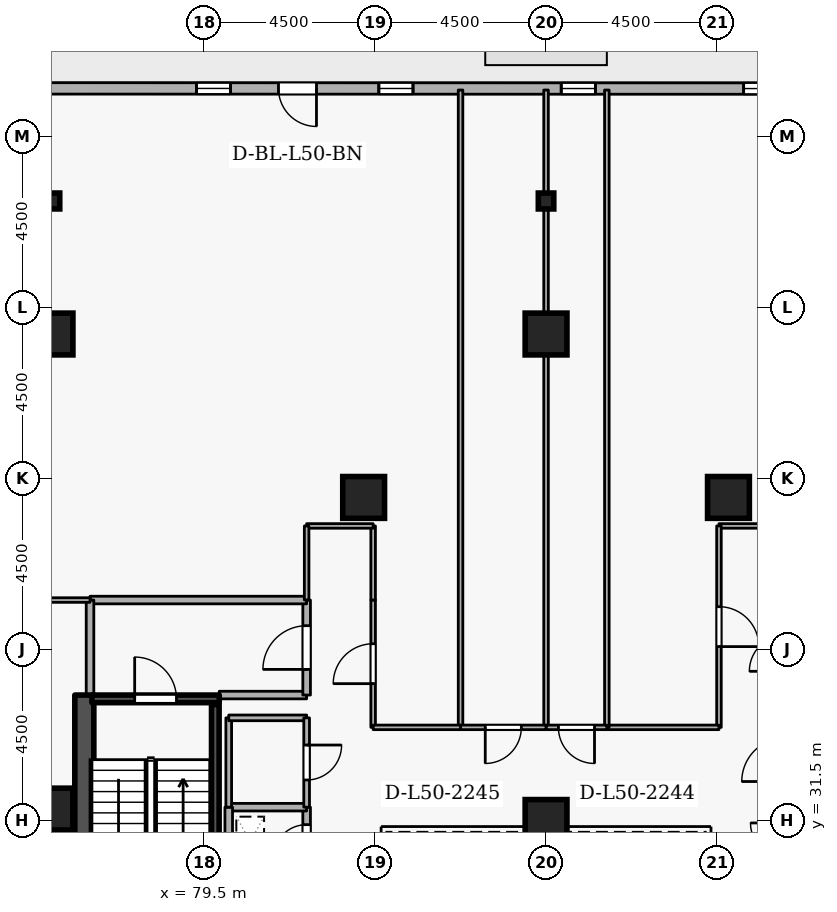
"""IFC4 building model, lengths in metres.
Left out: names, types, materials, properties, quantities, classifications, styles, units other than length and angle.
Written with IfcOpenShell. Run it as: python <this file> out.ifc"""

import sys

from ifc_helpers import new_model, si_unit, direction, frame, frame_2d, origin, origin_2d, place, context, subcontext, project, spatial, rectangle, i_section, extrude, element, fill, save


model = new_model("IFC4")
c1 = context("Model", 3, precision=1e-05, world=origin(), true_north=direction((0.0, 1.0)))
c2 = subcontext(c1, "Body", "Model", "MODEL_VIEW")
j1 = project(units=[si_unit("LENGTHUNIT", "METRE"), si_unit("PLANEANGLEUNIT", "RADIAN")], contexts=[c1])
p1 = place(None, origin())
s1 = spatial("IfcSite", under=j1, at=p1, CompositionType="ELEMENT")
p2 = place(p1, origin())
s2 = spatial("IfcBuilding", under=s1, at=p2, CompositionType="ELEMENT")
p3 = place(p2, frame((0.0, 0.0, 189.3)))
s3 = spatial("IfcBuildingStorey", under=s2, at=p3, CompositionType="ELEMENT", Elevation=189.3)
p4 = place(p3, frame((76.35, 19.2, 0.0), z_axis=(0.0, 0.0, 1.0), x_axis=(0.0, 1.0, 0.0)))
e1 = element("IfcWall", 1, at=p4, inside=s3, PredefinedType="SHEAR", context=c2, shape_type="SweptSolid", body=[
    extrude(rectangle(XDim=15.6, YDim=0.5, at=frame_2d((7.8, 0.0))), origin(), (0.0, 0.0, 1.0), 3.6),
])
for number, where, z_axis, x_axis in (
    (2, (88.5, 44.3, 0.0), (0.0, 0.0, 1.0), (1.0, 0.0, 0.0)),
    (3, (75.5, 44.3, 0.0), (0.0, 0.0, 1.0), (1.0, 0.0, 0.0)),
    (4, (93.3, 40.0, 0.0), (0.0, 0.0, 1.0), (1.0, 0.0, 0.0)),
    (5, (83.7, 40.0, 0.0), (0.0, 0.0, 1.0), (1.0, 0.0, 0.0)),
    (6, (75.5, 31.8, 0.0), (0.0, 0.0, 1.0), (1.0, 0.0, 0.0)),
    (7, (88.5, 31.5, 0.0), (0.0, 0.0, 1.0), (1.0, 0.0, 0.0)),
):
    element("IfcColumn", number, at=place(p3, frame(where, z_axis=z_axis, x_axis=x_axis)), inside=s3, PredefinedType="COLUMN", context=c2, shape_type="SweptSolid", body=[
        extrude(rectangle(XDim=1.1, YDim=1.1, at=origin_2d()), origin(), (0.0, 0.0, 1.0), 3.6),
    ])
for number, where, z_axis, x_axis in (
    (8, (88.5, 47.8, 0.0), (0.0, 0.0, 1.0), (1.0, 0.0, 0.0)),
    (9, (75.5, 47.8, 0.0), (0.0, 0.0, 1.0), (1.0, 0.0, 0.0)),
):
    element("IfcColumn", number, at=place(p3, frame(where, z_axis=z_axis, x_axis=x_axis)), inside=s3, PredefinedType="COLUMN", context=c2, shape_type="SweptSolid", body=[
        extrude(i_section(OverallWidth=0.407, OverallDepth=0.419, WebThickness=0.031, FlangeThickness=0.049, FilletRadius=0.015, at=origin_2d()), origin(), (0.0, 0.0, 1.0), 3.6),
    ])
p5 = place(p3, frame((101.199, 50.756, 0.0), z_axis=(0.0, 0.0, 1.0), x_axis=(-0.999999969988, 0.000244999128, 0.0)))
e10 = element("IfcWall", 10, at=p5, inside=s3, PredefinedType="STANDARD", context=c2, shape_type="SweptSolid", body=[
    extrude(rectangle(XDim=33.881, YDim=0.3, at=frame_2d((16.94, 0.0))), origin(), (0.0, 0.0, 1.0), 2.7),
])
p6 = place(p5, frame((18.74, 0.0, 0.0)))
e11 = element("IfcOpeningElement", 11, at=p6, cuts=e10, PredefinedType="OPENING", context=c2, shape_type="SweptSolid", body=[
    extrude(rectangle(XDim=1.0, YDim=2.08, at=frame_2d((0.5, 1.04))), frame((0.0, 0.16, 0.0), z_axis=(0.0, -1.0, 0.0), x_axis=(1.0, 0.0, 0.0)), (0.0, 0.0, 1.0), 0.32),
])
p7 = place(p5, frame((1.8, 0.0, 0.72)))
e12 = element("IfcOpeningElement", 12, at=p7, cuts=e10, PredefinedType="OPENING", context=c2, shape_type="SweptSolid", body=[
    extrude(rectangle(XDim=0.9, YDim=1.75, at=frame_2d((0.45, 0.875))), frame((0.0, 0.16, 0.0), z_axis=(0.0, -1.0, 0.0), x_axis=(1.0, 0.0, 0.0)), (0.0, 0.0, 1.0), 0.32),
])
p8 = place(p5, frame((6.6, 0.0, 0.72)))
e13 = element("IfcOpeningElement", 13, at=p8, cuts=e10, PredefinedType="OPENING", context=c2, shape_type="SweptSolid", body=[
    extrude(rectangle(XDim=0.9, YDim=1.75, at=frame_2d((0.45, 0.875))), frame((0.0, 0.16, 0.0), z_axis=(0.0, -1.0, 0.0), x_axis=(1.0, 0.0, 0.0)), (0.0, 0.0, 1.0), 0.32),
])
p9 = place(p5, frame((11.4, 0.0, 0.72)))
e14 = element("IfcOpeningElement", 14, at=p9, cuts=e10, PredefinedType="OPENING", context=c2, shape_type="SweptSolid", body=[
    extrude(rectangle(XDim=0.9, YDim=1.75, at=frame_2d((0.45, 0.875))), frame((0.0, 0.16, 0.0), z_axis=(0.0, -1.0, 0.0), x_axis=(1.0, 0.0, 0.0)), (0.0, 0.0, 1.0), 0.32),
])
p10 = place(p5, frame((16.2, 0.0, 0.72)))
e15 = element("IfcOpeningElement", 15, at=p10, cuts=e10, PredefinedType="OPENING", context=c2, shape_type="SweptSolid", body=[
    extrude(rectangle(XDim=0.9, YDim=1.75, at=frame_2d((0.45, 0.875))), frame((0.0, 0.16, 0.0), z_axis=(0.0, -1.0, 0.0), x_axis=(1.0, 0.0, 0.0)), (0.0, 0.0, 1.0), 0.32),
])
p11 = place(p5, frame((21.0, 0.0, 0.72)))
e16 = element("IfcOpeningElement", 16, at=p11, cuts=e10, PredefinedType="OPENING", context=c2, shape_type="SweptSolid", body=[
    extrude(rectangle(XDim=0.9, YDim=1.75, at=frame_2d((0.45, 0.875))), frame((0.0, 0.16, 0.0), z_axis=(0.0, -1.0, 0.0), x_axis=(1.0, 0.0, 0.0)), (0.0, 0.0, 1.0), 0.32),
])
p12 = place(p5, frame((25.8, 0.0, 0.72)))
e17 = element("IfcOpeningElement", 17, at=p12, cuts=e10, PredefinedType="OPENING", context=c2, shape_type="SweptSolid", body=[
    extrude(rectangle(XDim=0.9, YDim=1.75, at=frame_2d((0.45, 0.875))), frame((0.0, 0.16, 0.0), z_axis=(0.0, -1.0, 0.0), x_axis=(1.0, 0.0, 0.0)), (0.0, 0.0, 1.0), 0.32),
])
p13 = place(p5, frame((30.6, 0.0, 0.72)))
e18 = element("IfcOpeningElement", 18, at=p13, cuts=e10, PredefinedType="OPENING", context=c2, shape_type="SweptSolid", body=[
    extrude(rectangle(XDim=0.9, YDim=1.75, at=frame_2d((0.45, 0.875))), frame((0.0, 0.16, 0.0), z_axis=(0.0, -1.0, 0.0), x_axis=(1.0, 0.0, 0.0)), (0.0, 0.0, 1.0), 0.32),
])
p14 = place(p3, frame((76.55, 34.7, 0.0), z_axis=(0.0, 0.0, 1.0), x_axis=(1.0, 0.0, 0.0)))
e19 = element("IfcWall", 19, at=p14, inside=s3, PredefinedType="SHEAR", context=c2, shape_type="SweptSolid", body=[
    extrude(rectangle(XDim=3.35, YDim=0.2, at=frame_2d((1.675, 0.0))), origin(), (0.0, 0.0, 1.0), 3.6),
])
p15 = place(p14, frame((1.125, 0.0, 0.0)))
e20 = element("IfcOpeningElement", 20, at=p15, cuts=e19, PredefinedType="OPENING", context=c2, shape_type="SweptSolid", body=[
    extrude(rectangle(XDim=1.1, YDim=2.1, at=frame_2d((0.55, 1.05))), frame((0.0, 0.11, 0.0), z_axis=(0.0, -1.0, 0.0), x_axis=(1.0, 0.0, 0.0)), (0.0, 0.0, 1.0), 0.22),
])
p16 = place(p3, frame((79.797, 27.45, 0.0), z_axis=(0.0, 0.0, 1.0), x_axis=(0.0, 1.0, 0.0)))
e21 = element("IfcWall", 21, at=p16, inside=s3, PredefinedType="SHEAR", context=c2, shape_type="SweptSolid", body=[
    extrude(rectangle(XDim=7.1, YDim=0.2, at=frame_2d((3.55, 0.0))), origin(), (0.0, 0.0, 1.0), 3.6),
])
p17 = place(p3, frame((79.9, 34.8, 0.0), z_axis=(0.0, 0.0, 1.0), x_axis=(1.0, 0.0, 0.0)))
e22 = element("IfcWall", 22, at=p17, inside=s3, PredefinedType="STANDARD", context=c2, shape_type="SweptSolid", body=[
    extrude(rectangle(XDim=2.3, YDim=0.2, at=frame_2d((1.15, 0.0))), origin(), (0.0, 0.0, 1.0), 2.545),
])
p18 = place(p3, frame((82.2, 34.8, 0.0), z_axis=(0.0, 0.0, 1.0), x_axis=(0.0, 1.0, 0.0)))
e23 = element("IfcWall", 23, at=p18, inside=s3, PredefinedType="STANDARD", context=c2, shape_type="SweptSolid", body=[
    extrude(rectangle(XDim=2.5, YDim=0.2, at=frame_2d((1.25, 0.0))), origin(), (0.0, 0.0, 1.0), 3.34),
])
p19 = place(p18, frame((0.675, 0.0, 0.0)))
e24 = element("IfcOpeningElement", 24, at=p19, cuts=e23, PredefinedType="OPENING", context=c2, shape_type="SweptSolid", body=[
    extrude(rectangle(XDim=1.15, YDim=2.1, at=frame_2d((0.575, 1.05))), frame((0.0, 0.11, 0.0), z_axis=(0.0, -1.0, 0.0), x_axis=(1.0, 0.0, 0.0)), (0.0, 0.0, 1.0), 0.22),
])
p20 = place(p3, frame((82.2, 37.3, 0.0), z_axis=(0.0, 0.0, 1.0), x_axis=(-1.0, 0.0, 0.0)))
e25 = element("IfcWall", 25, at=p20, inside=s3, PredefinedType="STANDARD", context=c2, shape_type="SweptSolid", body=[
    extrude(rectangle(XDim=5.7, YDim=0.2, at=frame_2d((2.85, 0.0))), origin(), (0.0, 0.0, 1.0), 3.34),
])
p21 = place(p3, frame((76.5, 37.3, 0.0), z_axis=(0.0, 0.0, 1.0), x_axis=(0.0, -1.0, 0.0)))
e26 = element("IfcWall", 26, at=p21, inside=s3, PredefinedType="STANDARD", context=c2, shape_type="SweptSolid", body=[
    extrude(rectangle(XDim=2.5, YDim=0.2, at=frame_2d((1.25, 0.0))), origin(), (0.0, 0.0, 1.0), 3.34),
])
p22 = place(p3, frame((82.2, 30.05, 0.0), z_axis=(0.0, 0.0, 1.0), x_axis=(0.0, 1.0, 0.0)))
e27 = element("IfcWall", 27, at=p22, inside=s3, PredefinedType="STANDARD", context=c2, shape_type="SweptSolid", body=[
    extrude(rectangle(XDim=1.8, YDim=0.2, at=frame_2d((0.9, 0.0))), origin(), (0.0, 0.0, 1.0), 3.34),
])
p23 = place(p22, frame((0.46, 0.0, 0.0)))
e28 = element("IfcOpeningElement", 28, at=p23, cuts=e27, PredefinedType="OPENING", context=c2, shape_type="SweptSolid", body=[
    extrude(rectangle(XDim=0.88, YDim=2.04, at=frame_2d((0.44, 1.02))), frame((0.0, 0.11, 0.0), z_axis=(0.0, -1.0, 0.0), x_axis=(1.0, 0.0, 0.0)), (0.0, 0.0, 1.0), 0.22),
])
p24 = place(p3, frame((82.2, 31.85, 0.0), z_axis=(0.0, 0.0, 1.0), x_axis=(-1.0, 0.0, 0.0)))
e29 = element("IfcWall", 29, at=p24, inside=s3, PredefinedType="STANDARD", context=c2, shape_type="SweptSolid", body=[
    extrude(rectangle(XDim=2.05, YDim=0.2, at=frame_2d((1.025, 0.0))), origin(), (0.0, 0.0, 1.0), 3.34),
])
p25 = place(p3, frame((80.15, 31.85, 0.0), z_axis=(0.0, 0.0, 1.0), x_axis=(0.0, -1.0, 0.0)))
e30 = element("IfcWall", 30, at=p25, inside=s3, PredefinedType="STANDARD", context=c2, shape_type="SweptSolid", body=[
    extrude(rectangle(XDim=1.8, YDim=0.2, at=frame_2d((0.9, 0.0))), origin(), (0.0, 0.0, 1.0), 3.34),
])
p26 = place(p3, frame((80.15, 31.85, 0.0), z_axis=(0.0, 0.0, 1.0), x_axis=(0.0, 1.0, 0.0)))
e31 = element("IfcWall", 31, at=p26, inside=s3, PredefinedType="PARTITIONING", context=c2, shape_type="SweptSolid", body=[
    extrude(rectangle(XDim=2.35, YDim=0.15, at=frame_2d((1.175, 0.0))), origin(), (0.0, 0.0, 1.0), 3.34),
])
p27 = place(p3, frame((80.15, 34.2, 0.0), z_axis=(0.0, 0.0, 1.0), x_axis=(1.0, 0.0, 0.0)))
e32 = element("IfcWall", 32, at=p27, inside=s3, PredefinedType="PARTITIONING", context=c2, shape_type="SweptSolid", body=[
    extrude(rectangle(XDim=2.05, YDim=0.15, at=frame_2d((1.025, 0.0))), origin(), (0.0, 0.0, 1.0), 2.545),
])
p28 = place(p3, frame((82.2, 34.2, 0.0), z_axis=(0.0, 0.0, 1.0), x_axis=(0.0, -1.0, 0.0)))
e33 = element("IfcWall", 33, at=p28, inside=s3, PredefinedType="PARTITIONING", context=c2, shape_type="SweptSolid", body=[
    extrude(rectangle(XDim=2.35, YDim=0.15, at=frame_2d((1.175, 0.0))), origin(), (0.0, 0.0, 1.0), 3.34),
])
p29 = place(p28, frame((0.715, 0.0, 0.0)))
e34 = element("IfcOpeningElement", 34, at=p29, cuts=e33, PredefinedType="OPENING", context=c2, shape_type="SweptSolid", body=[
    extrude(rectangle(XDim=0.92, YDim=2.08, at=frame_2d((0.46, 1.04))), frame((0.0, 0.085, 0.0), z_axis=(0.0, -1.0, 0.0), x_axis=(1.0, 0.0, 0.0)), (0.0, 0.0, 1.0), 0.17),
])
p30 = place(p3, frame((94.8, 39.25, 0.0), z_axis=(0.0, 0.0, 1.0), x_axis=(-1.0, 0.0, 0.0)))
e35 = element("IfcWall", 35, at=p30, inside=s3, PredefinedType="PARTITIONING", context=c2, shape_type="SweptSolid", body=[
    extrude(rectangle(XDim=1.75, YDim=0.12, at=frame_2d((0.875, 0.0))), origin(), (0.0, 0.0, 1.0), 3.34),
])
p31 = place(p3, frame((93.05, 39.25, 0.0), z_axis=(0.0, 0.0, 1.0), x_axis=(0.0, -1.0, 0.0)))
e36 = element("IfcWall", 36, at=p31, inside=s3, PredefinedType="PARTITIONING", context=c2, shape_type="SweptSolid", body=[
    extrude(rectangle(XDim=5.3, YDim=0.12, at=frame_2d((2.65, 0.0))), origin(), (0.0, 0.0, 1.0), 3.34),
])
p32 = place(p31, frame((2.125, 0.0, 0.0)))
e37 = element("IfcOpeningElement", 37, at=p32, cuts=e36, PredefinedType="OPENING", context=c2, shape_type="SweptSolid", body=[
    extrude(rectangle(XDim=1.05, YDim=2.1, at=frame_2d((0.525, 1.05))), frame((0.0, 0.07, 0.0), z_axis=(0.0, -1.0, 0.0), x_axis=(1.0, 0.0, 0.0)), (0.0, 0.0, 1.0), 0.14),
])
p33 = place(p3, frame((93.05, 33.95, 0.0), z_axis=(0.0, 0.0, 1.0), x_axis=(-1.0, 0.0, 0.0)))
e38 = element("IfcWall", 38, at=p33, inside=s3, PredefinedType="PARTITIONING", context=c2, shape_type="SweptSolid", body=[
    extrude(rectangle(XDim=2.95, YDim=0.12, at=frame_2d((1.475, 0.0))), origin(), (0.0, 0.0, 1.0), 3.34),
])
p34 = place(p3, frame((90.1, 33.95, 0.0), z_axis=(0.0, 0.0, 1.0), x_axis=(0.0, 1.0, 0.0)))
e39 = element("IfcWall", 39, at=p34, inside=s3, PredefinedType="PARTITIONING", context=c2, shape_type="SweptSolid", body=[
    extrude(rectangle(XDim=16.77, YDim=0.12, at=frame_2d((8.385, 0.0))), origin(), (0.0, 0.0, 1.0), 3.34),
])
p35 = place(p3, frame((88.5, 33.95, 0.0), z_axis=(0.0, 0.0, 1.0), x_axis=(0.0, 1.0, 0.0)))
e40 = element("IfcWall", 40, at=p35, inside=s3, PredefinedType="PARTITIONING", context=c2, shape_type="SweptSolid", body=[
    extrude(rectangle(XDim=16.77, YDim=0.12, at=frame_2d((8.385, 0.0))), origin(), (0.0, 0.0, 1.0), 2.878),
])
p36 = place(p3, frame((90.1, 33.95, 0.0), z_axis=(0.0, 0.0, 1.0), x_axis=(-1.0, 0.0, 0.0)))
e41 = element("IfcWall", 41, at=p36, inside=s3, PredefinedType="PARTITIONING", context=c2, shape_type="SweptSolid", body=[
    extrude(rectangle(XDim=1.6, YDim=0.12, at=frame_2d((0.8, 0.0))), origin(), (0.0, 0.0, 1.0), 3.34),
])
p37 = place(p36, frame((0.325, 0.0, 0.0)))
e42 = element("IfcOpeningElement", 42, at=p37, cuts=e41, PredefinedType="OPENING", context=c2, shape_type="SweptSolid", body=[
    extrude(rectangle(XDim=0.95, YDim=2.1, at=frame_2d((0.475, 1.05))), frame((0.0, 0.07, 0.0), z_axis=(0.0, -1.0, 0.0), x_axis=(1.0, 0.0, 0.0)), (0.0, 0.0, 1.0), 0.14),
])
p38 = place(p3, frame((86.25, 33.95, 0.0), z_axis=(0.0, 0.0, 1.0), x_axis=(0.0, 1.0, 0.0)))
e43 = element("IfcWall", 43, at=p38, inside=s3, PredefinedType="PARTITIONING", context=c2, shape_type="SweptSolid", body=[
    extrude(rectangle(XDim=16.77, YDim=0.12, at=frame_2d((8.385, 0.0))), origin(), (0.0, 0.0, 1.0), 3.34),
])
p39 = place(p3, frame((88.5, 33.95, 0.0), z_axis=(0.0, 0.0, 1.0), x_axis=(-1.0, 0.0, 0.0)))
e44 = element("IfcWall", 44, at=p39, inside=s3, PredefinedType="PARTITIONING", context=c2, shape_type="SweptSolid", body=[
    extrude(rectangle(XDim=2.25, YDim=0.12, at=frame_2d((1.125, 0.0))), origin(), (0.0, 0.0, 1.0), 3.34),
])
p40 = place(p39, frame((0.65, 0.0, 0.0)))
e45 = element("IfcOpeningElement", 45, at=p40, cuts=e44, PredefinedType="OPENING", context=c2, shape_type="SweptSolid", body=[
    extrude(rectangle(XDim=0.95, YDim=2.1, at=frame_2d((0.475, 1.05))), frame((0.0, 0.07, 0.0), z_axis=(0.0, -1.0, 0.0), x_axis=(1.0, 0.0, 0.0)), (0.0, 0.0, 1.0), 0.14),
])
p41 = place(p3, frame((83.95, 33.95, 0.0), z_axis=(0.0, 0.0, 1.0), x_axis=(0.0, 1.0, 0.0)))
e46 = element("IfcWall", 46, at=p41, inside=s3, PredefinedType="PARTITIONING", context=c2, shape_type="SweptSolid", body=[
    extrude(rectangle(XDim=3.35, YDim=0.12, at=frame_2d((1.675, 0.0))), origin(), (0.0, 0.0, 1.0), 3.34),
])
p42 = place(p41, frame((1.15, 0.0, 0.0)))
e47 = element("IfcOpeningElement", 47, at=p42, cuts=e46, PredefinedType="OPENING", context=c2, shape_type="SweptSolid", body=[
    extrude(rectangle(XDim=1.05, YDim=2.1, at=frame_2d((0.525, 1.05))), frame((0.0, 0.07, 0.0), z_axis=(0.0, -1.0, 0.0), x_axis=(1.0, 0.0, 0.0)), (0.0, 0.0, 1.0), 0.14),
])
p43 = place(p3, frame((83.95, 37.3, 0.0), z_axis=(0.0, 0.0, 1.0), x_axis=(0.0, 1.0, 0.0)))
e48 = element("IfcWall", 48, at=p43, inside=s3, PredefinedType="PARTITIONING", context=c2, shape_type="SweptSolid", body=[
    extrude(rectangle(XDim=1.95, YDim=0.12, at=frame_2d((0.975, 0.0))), origin(), (0.0, 0.0, 1.0), 3.34),
])
p44 = place(p3, frame((83.95, 39.25, 0.0), z_axis=(0.0, 0.0, 1.0), x_axis=(-1.0, 0.0, 0.0)))
e49 = element("IfcWall", 49, at=p44, inside=s3, PredefinedType="PARTITIONING", context=c2, shape_type="SweptSolid", body=[
    extrude(rectangle(XDim=1.75, YDim=0.12, at=frame_2d((0.875, 0.0))), origin(), (0.0, 0.0, 1.0), 3.34),
])
p45 = place(p3, frame((82.2, 39.25, 0.0), z_axis=(0.0, 0.0, 1.0), x_axis=(0.0, -1.0, 0.0)))
e50 = element("IfcWall", 50, at=p45, inside=s3, PredefinedType="PARTITIONING", context=c2, shape_type="SweptSolid", body=[
    extrude(rectangle(XDim=1.95, YDim=0.12, at=frame_2d((0.975, 0.0))), origin(), (0.0, 0.0, 1.0), 3.34),
])
p46 = place(p3, frame((76.5, 37.3, 0.0), z_axis=(0.0, 0.0, 1.0), x_axis=(-1.0, 0.0, 0.0)))
e51 = element("IfcWall", 51, at=p46, inside=s3, PredefinedType="PARTITIONING", context=c2, shape_type="SweptSolid", body=[
    extrude(rectangle(XDim=11.72, YDim=0.12, at=frame_2d((5.86, 0.0))), origin(), (0.0, 0.0, 1.0), 3.34),
])
p47 = place(p3, frame((86.25, 33.95, 0.0), z_axis=(0.0, 0.0, 1.0), x_axis=(-1.0, 0.0, 0.0)))
e52 = element("IfcWall", 52, at=p47, inside=s3, PredefinedType="PARTITIONING", context=c2, shape_type="SweptSolid", body=[
    extrude(rectangle(XDim=2.3, YDim=0.12, at=frame_2d((1.15, 0.0))), origin(), (0.0, 0.0, 1.0), 3.34),
])
p48 = place(p6, origin())
e53 = element("IfcDoor", 53, at=p48, inside=s3, OperationType="SINGLE_SWING_LEFT", PredefinedType="DOOR", context=c2, shape_type="SweptSolid", body=[
    extrude(rectangle(XDim=1.0, YDim=2.08, at=frame_2d((0.5, 1.04))), frame((0.0, 0.025, 0.0), z_axis=(0.0, -1.0, 0.0), x_axis=(1.0, 0.0, 0.0)), (0.0, 0.0, 1.0), 0.05),
])
fill(e11, e53)
p49 = place(p8, origin())
e54 = element("IfcWindow", 54, at=p49, inside=s3, PartitioningType="SINGLE_PANEL", PredefinedType="WINDOW", context=c2, shape_type="SweptSolid", body=[
    extrude(rectangle(XDim=0.9, YDim=1.75, at=frame_2d((0.45, 0.875))), frame((0.0, 0.03, 0.0), z_axis=(0.0, -1.0, 0.0), x_axis=(1.0, 0.0, 0.0)), (0.0, 0.0, 1.0), 0.06),
])
fill(e13, e54)
p50 = place(p9, origin())
e55 = element("IfcWindow", 55, at=p50, inside=s3, PartitioningType="SINGLE_PANEL", PredefinedType="WINDOW", context=c2, shape_type="SweptSolid", body=[
    extrude(rectangle(XDim=0.9, YDim=1.75, at=frame_2d((0.45, 0.875))), frame((0.0, 0.03, 0.0), z_axis=(0.0, -1.0, 0.0), x_axis=(1.0, 0.0, 0.0)), (0.0, 0.0, 1.0), 0.06),
])
fill(e14, e55)
p51 = place(p10, origin())
e56 = element("IfcWindow", 56, at=p51, inside=s3, PartitioningType="SINGLE_PANEL", PredefinedType="WINDOW", context=c2, shape_type="SweptSolid", body=[
    extrude(rectangle(XDim=0.9, YDim=1.75, at=frame_2d((0.45, 0.875))), frame((0.0, 0.03, 0.0), z_axis=(0.0, -1.0, 0.0), x_axis=(1.0, 0.0, 0.0)), (0.0, 0.0, 1.0), 0.06),
])
fill(e15, e56)
p52 = place(p11, origin())
e57 = element("IfcWindow", 57, at=p52, inside=s3, PartitioningType="SINGLE_PANEL", PredefinedType="WINDOW", context=c2, shape_type="SweptSolid", body=[
    extrude(rectangle(XDim=0.9, YDim=1.75, at=frame_2d((0.45, 0.875))), frame((0.0, 0.03, 0.0), z_axis=(0.0, -1.0, 0.0), x_axis=(1.0, 0.0, 0.0)), (0.0, 0.0, 1.0), 0.06),
])
fill(e16, e57)
p53 = place(p15, origin())
e58 = element("IfcDoor", 58, at=p53, inside=s3, OperationType="SINGLE_SWING_LEFT", PredefinedType="DOOR", context=c2, shape_type="SweptSolid", body=[
    extrude(rectangle(XDim=1.1, YDim=2.1, at=frame_2d((0.55, 1.05))), frame((0.0, 0.025, 0.0), z_axis=(0.0, -1.0, 0.0), x_axis=(1.0, 0.0, 0.0)), (0.0, 0.0, 1.0), 0.05),
])
fill(e20, e58)
p54 = place(p19, origin())
e59 = element("IfcDoor", 59, at=p54, inside=s3, OperationType="SINGLE_SWING_LEFT", PredefinedType="DOOR", context=c2, shape_type="SweptSolid", body=[
    extrude(rectangle(XDim=1.15, YDim=2.1, at=frame_2d((0.575, 1.05))), frame((0.0, 0.025, 0.0), z_axis=(0.0, -1.0, 0.0), x_axis=(1.0, 0.0, 0.0)), (0.0, 0.0, 1.0), 0.05),
])
fill(e24, e59)
p55 = place(p23, origin())
e60 = element("IfcDoor", 60, at=p55, inside=s3, OperationType="SINGLE_SWING_LEFT", PredefinedType="DOOR", context=c2, shape_type="SweptSolid", body=[
    extrude(rectangle(XDim=0.88, YDim=2.04, at=frame_2d((0.44, 1.02))), frame((0.0, 0.025, 0.0), z_axis=(0.0, -1.0, 0.0), x_axis=(1.0, 0.0, 0.0)), (0.0, 0.0, 1.0), 0.05),
])
fill(e28, e60)
p56 = place(p29, origin())
e61 = element("IfcDoor", 61, at=p56, inside=s3, OperationType="SINGLE_SWING_LEFT", PredefinedType="DOOR", context=c2, shape_type="SweptSolid", body=[
    extrude(rectangle(XDim=0.92, YDim=2.08, at=frame_2d((0.46, 1.04))), frame((0.0, 0.025, 0.0), z_axis=(0.0, -1.0, 0.0), x_axis=(1.0, 0.0, 0.0)), (0.0, 0.0, 1.0), 0.05),
])
fill(e34, e61)
p57 = place(p32, origin())
e62 = element("IfcDoor", 62, at=p57, inside=s3, OperationType="SINGLE_SWING_RIGHT", PredefinedType="DOOR", context=c2, shape_type="SweptSolid", body=[
    extrude(rectangle(XDim=1.05, YDim=2.1, at=frame_2d((0.525, 1.05))), frame((0.0, 0.025, 0.0), z_axis=(0.0, -1.0, 0.0), x_axis=(1.0, 0.0, 0.0)), (0.0, 0.0, 1.0), 0.05),
])
fill(e37, e62)
p58 = place(p37, origin())
e63 = element("IfcDoor", 63, at=p58, inside=s3, OperationType="SINGLE_SWING_LEFT", PredefinedType="DOOR", context=c2, shape_type="SweptSolid", body=[
    extrude(rectangle(XDim=0.95, YDim=2.1, at=frame_2d((0.475, 1.05))), frame((0.0, 0.025, 0.0), z_axis=(0.0, -1.0, 0.0), x_axis=(1.0, 0.0, 0.0)), (0.0, 0.0, 1.0), 0.05),
])
fill(e42, e63)
p59 = place(p40, origin())
e64 = element("IfcDoor", 64, at=p59, inside=s3, OperationType="SINGLE_SWING_RIGHT", PredefinedType="DOOR", context=c2, shape_type="SweptSolid", body=[
    extrude(rectangle(XDim=0.95, YDim=2.1, at=frame_2d((0.475, 1.05))), frame((0.0, 0.025, 0.0), z_axis=(0.0, -1.0, 0.0), x_axis=(1.0, 0.0, 0.0)), (0.0, 0.0, 1.0), 0.05),
])
fill(e45, e64)
p60 = place(p42, origin())
e65 = element("IfcDoor", 65, at=p60, inside=s3, OperationType="SINGLE_SWING_LEFT", PredefinedType="DOOR", context=c2, shape_type="SweptSolid", body=[
    extrude(rectangle(XDim=1.05, YDim=2.1, at=frame_2d((0.525, 1.05))), frame((0.0, 0.025, 0.0), z_axis=(0.0, -1.0, 0.0), x_axis=(1.0, 0.0, 0.0)), (0.0, 0.0, 1.0), 0.05),
])
fill(e47, e65)
save(model, sys.argv[1])
